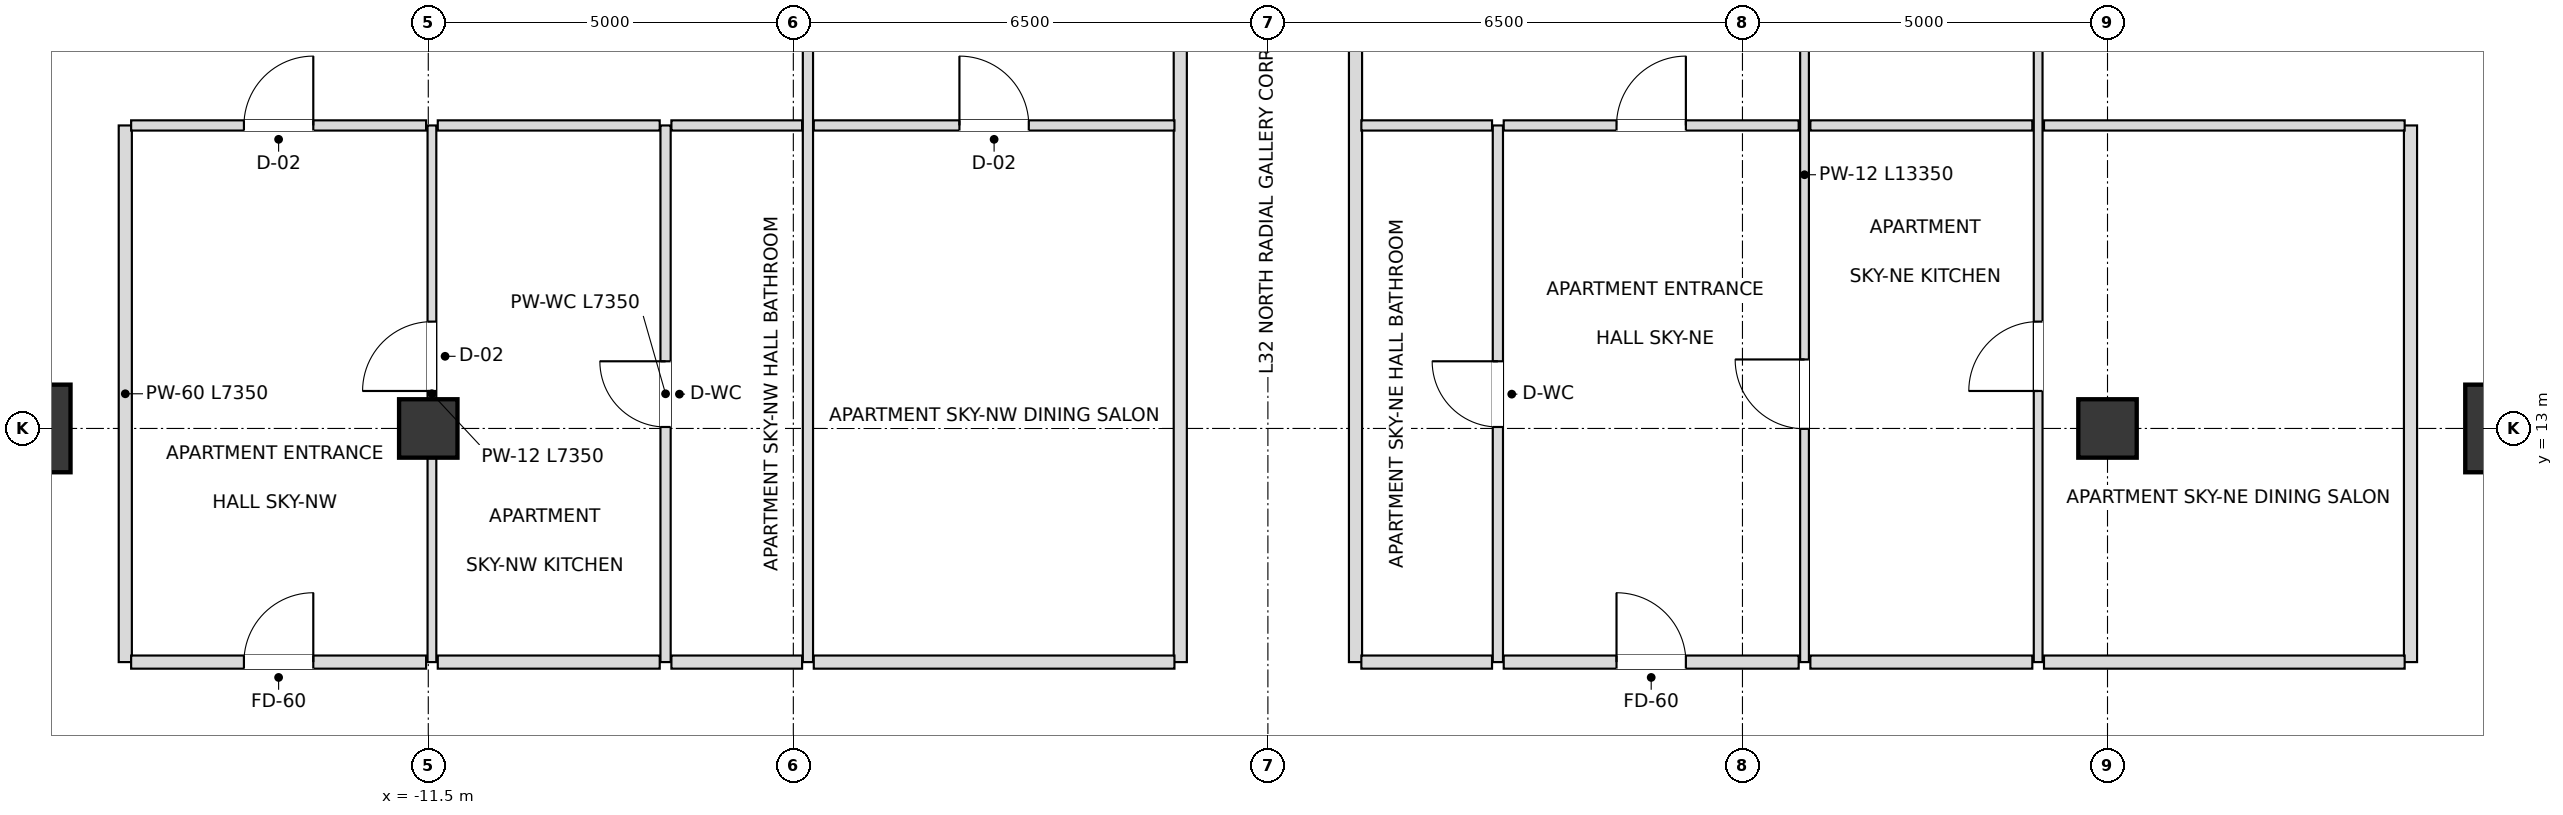
"""IFC4 building model, lengths in metres.
Left out: names, types, materials, properties, quantities, classifications, styles, units other than length and angle.
Written with IfcOpenShell. Run it as: python <this file> out.ifc"""

import sys

from ifc_helpers import new_model, si_unit, direction, frame, frame_2d, origin, origin_2d, place, context, subcontext, project, spatial, rectangle, extrude, element, fill, save


model = new_model("IFC4")
c1 = context("Model", 3, precision=1e-05, world=origin(), true_north=direction((0.0, 1.0)))
c2 = subcontext(c1, "Body", "Model", "MODEL_VIEW")
j1 = project(units=[si_unit("LENGTHUNIT", "METRE"), si_unit("PLANEANGLEUNIT", "RADIAN")], contexts=[c1])
p1 = place(None, origin())
s1 = spatial("IfcSite", under=j1, at=p1, CompositionType="ELEMENT")
p2 = place(p1, origin())
s2 = spatial("IfcBuilding", under=s1, at=p2, CompositionType="ELEMENT")
p3 = place(p2, frame((0.0, 0.0, 129.6)))
s3 = spatial("IfcBuildingStorey", under=s2, at=p3, CompositionType="ELEMENT", Elevation=129.6)
for number, where, z_axis, x_axis in (
    (1, (17.0, 13.0, 0.0), (0.0, 0.0, 1.0), (1.0, 0.0, 0.0)),
    (2, (-17.0, 13.0, 0.0), (0.0, 0.0, 1.0), (1.0, 0.0, 0.0)),
):
    element("IfcColumn", number, at=place(p3, frame(where, z_axis=z_axis, x_axis=x_axis)), inside=s3, PredefinedType="USERDEFINED", context=c2, shape_type="SweptSolid", body=[
        extrude(rectangle(XDim=1.2, YDim=1.2, at=origin_2d()), origin(), (0.0, 0.0, 1.0), 3.6),
    ])
for number, where, z_axis, x_axis in (
    (3, (-11.5, 13.0, 0.0), (0.0, 0.0, 1.0), (1.0, 0.0, 0.0)),
    (4, (11.5, 13.0, 0.0), (0.0, 0.0, 1.0), (1.0, 0.0, 0.0)),
):
    element("IfcColumn", number, at=place(p3, frame(where, z_axis=z_axis, x_axis=x_axis)), inside=s3, PredefinedType="COLUMN", context=c2, shape_type="SweptSolid", body=[
        extrude(rectangle(XDim=0.8, YDim=0.8, at=origin_2d()), origin(), (0.0, 0.0, 1.0), 3.6),
    ])
p4 = place(p3, frame((-15.65, 9.8, 0.0), z_axis=(0.0, 0.0, 1.0), x_axis=(0.0, 1.0, 0.0)))
e5 = element("IfcWall", 5, at=p4, inside=s3, PredefinedType="PARTITIONING", context=c2, shape_type="SweptSolid", body=[
    extrude(rectangle(XDim=7.35, YDim=0.18, at=frame_2d((3.675, 0.0))), origin(), (0.0, 0.0, 1.0), 2.736),
])
p5 = place(p3, frame((-11.45, 9.8, 0.0), z_axis=(0.0, 0.0, 1.0), x_axis=(0.0, 1.0, 0.0)))
e6 = element("IfcWall", 6, at=p5, inside=s3, PredefinedType="PARTITIONING", context=c2, shape_type="SweptSolid", body=[
    extrude(rectangle(XDim=7.35, YDim=0.12, at=frame_2d((3.675, 0.0))), origin(), (0.0, 0.0, 1.0), 2.736),
])
p6 = place(p5, frame((3.713, 0.0, 0.0)))
e7 = element("IfcOpeningElement", 7, at=p6, cuts=e6, PredefinedType="OPENING", context=c2, shape_type="SweptSolid", body=[
    extrude(rectangle(XDim=0.95, YDim=2.1, at=frame_2d((0.475, 1.05))), frame((0.0, 0.07, 0.0), z_axis=(0.0, -1.0, 0.0), x_axis=(1.0, 0.0, 0.0)), (0.0, 0.0, 1.0), 0.14),
])
p7 = place(p3, frame((-8.25, 9.8, 0.0), z_axis=(0.0, 0.0, 1.0), x_axis=(0.0, 1.0, 0.0)))
e8 = element("IfcWall", 8, at=p7, inside=s3, PredefinedType="PARTITIONING", context=c2, shape_type="SweptSolid", body=[
    extrude(rectangle(XDim=7.35, YDim=0.14, at=frame_2d((3.675, 0.0))), origin(), (0.0, 0.0, 1.0), 2.816),
])
p8 = place(p7, frame((3.22, 0.0, 0.0)))
e9 = element("IfcOpeningElement", 9, at=p8, cuts=e8, PredefinedType="OPENING", context=c2, shape_type="SweptSolid", body=[
    extrude(rectangle(XDim=0.9, YDim=2.1, at=frame_2d((0.45, 1.05))), frame((0.0, 0.08, 0.0), z_axis=(0.0, -1.0, 0.0), x_axis=(1.0, 0.0, 0.0)), (0.0, 0.0, 1.0), 0.16),
])
p9 = place(p3, frame((-6.3, 9.8, 0.0), z_axis=(0.0, 0.0, 1.0), x_axis=(0.0, 1.0, 0.0)))
e10 = element("IfcWall", 10, at=p9, inside=s3, PredefinedType="PARTITIONING", context=c2, shape_type="SweptSolid", body=[
    extrude(rectangle(XDim=13.35, YDim=0.14, at=frame_2d((6.675, 0.0))), origin(), (0.0, 0.0, 1.0), 2.816),
])
p10 = place(p9, frame((11.051, 0.0, 0.0)))
e11 = element("IfcOpeningElement", 11, at=p10, cuts=e10, PredefinedType="OPENING", context=c2, shape_type="SweptSolid", body=[
    extrude(rectangle(XDim=0.9, YDim=2.1, at=frame_2d((0.45, 1.05))), frame((0.0, 0.08, 0.0), z_axis=(0.0, -1.0, 0.0), x_axis=(1.0, 0.0, 0.0)), (0.0, 0.0, 1.0), 0.16),
])
for number, where, z_axis, x_axis in (
    (12, (-1.2, 9.8, 0.0), (0.0, 0.0, 1.0), (0.0, 1.0, 0.0)),
    (13, (1.2, 9.8, 0.0), (0.0, 0.0, 1.0), (0.0, 1.0, 0.0)),
):
    element("IfcWall", number, at=place(p3, frame(where, z_axis=z_axis, x_axis=x_axis)), inside=s3, PredefinedType="PARTITIONING", context=c2, shape_type="SweptSolid", body=[
        extrude(rectangle(XDim=13.35, YDim=0.18, at=frame_2d((6.675, 0.0))), origin(), (0.0, 0.0, 1.0), 2.816),
    ])
p11 = place(p3, frame((3.15, 9.8, 0.0), z_axis=(0.0, 0.0, 1.0), x_axis=(0.0, 1.0, 0.0)))
e14 = element("IfcWall", 14, at=p11, inside=s3, PredefinedType="PARTITIONING", context=c2, shape_type="SweptSolid", body=[
    extrude(rectangle(XDim=7.35, YDim=0.14, at=frame_2d((3.675, 0.0))), origin(), (0.0, 0.0, 1.0), 3.38),
])
p12 = place(p11, frame((3.22, 0.0, 0.0)))
e15 = element("IfcOpeningElement", 15, at=p12, cuts=e14, PredefinedType="OPENING", context=c2, shape_type="SweptSolid", body=[
    extrude(rectangle(XDim=0.9, YDim=2.1, at=frame_2d((0.45, 1.05))), frame((0.0, 0.08, 0.0), z_axis=(0.0, -1.0, 0.0), x_axis=(1.0, 0.0, 0.0)), (0.0, 0.0, 1.0), 0.16),
])
p13 = place(p3, frame((7.35, 9.8, 0.0), z_axis=(0.0, 0.0, 1.0), x_axis=(0.0, 1.0, 0.0)))
e16 = element("IfcWall", 16, at=p13, inside=s3, PredefinedType="PARTITIONING", context=c2, shape_type="SweptSolid", body=[
    extrude(rectangle(XDim=13.35, YDim=0.12, at=frame_2d((6.675, 0.0))), origin(), (0.0, 0.0, 1.0), 2.816),
])
p14 = place(p13, frame((3.195, 0.0, 0.0)))
e17 = element("IfcOpeningElement", 17, at=p14, cuts=e16, PredefinedType="OPENING", context=c2, shape_type="SweptSolid", body=[
    extrude(rectangle(XDim=0.95, YDim=2.1, at=frame_2d((0.475, 1.05))), frame((0.0, 0.07, 0.0), z_axis=(0.0, -1.0, 0.0), x_axis=(1.0, 0.0, 0.0)), (0.0, 0.0, 1.0), 0.14),
])
p15 = place(p13, frame((11.051, 0.0, 0.0)))
e18 = element("IfcOpeningElement", 18, at=p15, cuts=e16, PredefinedType="OPENING", context=c2, shape_type="SweptSolid", body=[
    extrude(rectangle(XDim=0.9, YDim=2.1, at=frame_2d((0.45, 1.05))), frame((0.0, 0.07, 0.0), z_axis=(0.0, -1.0, 0.0), x_axis=(1.0, 0.0, 0.0)), (0.0, 0.0, 1.0), 0.14),
])
p16 = place(p3, frame((10.55, 9.8, 0.0), z_axis=(0.0, 0.0, 1.0), x_axis=(0.0, 1.0, 0.0)))
e19 = element("IfcWall", 19, at=p16, inside=s3, PredefinedType="PARTITIONING", context=c2, shape_type="SweptSolid", body=[
    extrude(rectangle(XDim=13.35, YDim=0.12, at=frame_2d((6.675, 0.0))), origin(), (0.0, 0.0, 1.0), 2.816),
])
p17 = place(p16, frame((3.713, 0.0, 0.0)))
e20 = element("IfcOpeningElement", 20, at=p17, cuts=e19, PredefinedType="OPENING", context=c2, shape_type="SweptSolid", body=[
    extrude(rectangle(XDim=0.95, YDim=2.1, at=frame_2d((0.475, 1.05))), frame((0.0, 0.07, 0.0), z_axis=(0.0, -1.0, 0.0), x_axis=(1.0, 0.0, 0.0)), (0.0, 0.0, 1.0), 0.14),
])
p18 = place(p16, frame((11.051, 0.0, 0.0)))
e21 = element("IfcOpeningElement", 21, at=p18, cuts=e19, PredefinedType="OPENING", context=c2, shape_type="SweptSolid", body=[
    extrude(rectangle(XDim=0.9, YDim=2.1, at=frame_2d((0.45, 1.05))), frame((0.0, 0.07, 0.0), z_axis=(0.0, -1.0, 0.0), x_axis=(1.0, 0.0, 0.0)), (0.0, 0.0, 1.0), 0.14),
])
p19 = place(p3, frame((15.65, 9.8, 0.0), z_axis=(0.0, 0.0, 1.0), x_axis=(0.0, 1.0, 0.0)))
e22 = element("IfcWall", 22, at=p19, inside=s3, PredefinedType="PARTITIONING", context=c2, shape_type="SweptSolid", body=[
    extrude(rectangle(XDim=7.35, YDim=0.18, at=frame_2d((3.675, 0.0))), origin(), (0.0, 0.0, 1.0), 2.736),
])
p20 = place(p3, frame((-15.57, 9.8, 0.0), z_axis=(0.0, 0.0, 1.0), x_axis=(1.0, 0.0, 0.0)))
e23 = element("IfcWall", 23, at=p20, inside=s3, PredefinedType="PARTITIONING", context=c2, shape_type="SweptSolid", body=[
    extrude(rectangle(XDim=4.04, YDim=0.18, at=frame_2d((2.02, 0.0))), origin(), (0.0, 0.0, 1.0), 3.38),
])
p21 = place(p20, frame((1.545, 0.0, 0.0)))
e24 = element("IfcOpeningElement", 24, at=p21, cuts=e23, PredefinedType="OPENING", context=c2, shape_type="SweptSolid", body=[
    extrude(rectangle(XDim=0.95, YDim=2.15, at=frame_2d((0.475, 1.075))), frame((0.0, 0.1, 0.0), z_axis=(0.0, -1.0, 0.0), x_axis=(1.0, 0.0, 0.0)), (0.0, 0.0, 1.0), 0.2),
])
p22 = place(p3, frame((-11.37, 9.8, 0.0), z_axis=(0.0, 0.0, 1.0), x_axis=(1.0, 0.0, 0.0)))
e25 = element("IfcWall", 25, at=p22, inside=s3, PredefinedType="PARTITIONING", context=c2, shape_type="SweptSolid", body=[
    extrude(rectangle(XDim=3.04, YDim=0.18, at=frame_2d((1.52, 0.0))), origin(), (0.0, 0.0, 1.0), 3.38),
])
p23 = place(p3, frame((-8.17, 9.8, 0.0), z_axis=(0.0, 0.0, 1.0), x_axis=(1.0, 0.0, 0.0)))
e26 = element("IfcWall", 26, at=p23, inside=s3, PredefinedType="PARTITIONING", context=c2, shape_type="SweptSolid", body=[
    extrude(rectangle(XDim=1.79, YDim=0.18, at=frame_2d((0.895, 0.0))), origin(), (0.0, 0.0, 1.0), 2.816),
])
p24 = place(p3, frame((-6.22, 9.8, 0.0), z_axis=(0.0, 0.0, 1.0), x_axis=(1.0, 0.0, 0.0)))
e27 = element("IfcWall", 27, at=p24, inside=s3, PredefinedType="PARTITIONING", context=c2, shape_type="SweptSolid", body=[
    extrude(rectangle(XDim=4.94, YDim=0.18, at=frame_2d((2.47, 0.0))), origin(), (0.0, 0.0, 1.0), 3.38),
])
p25 = place(p3, frame((1.28, 9.8, 0.0), z_axis=(0.0, 0.0, 1.0), x_axis=(1.0, 0.0, 0.0)))
e28 = element("IfcWall", 28, at=p25, inside=s3, PredefinedType="PARTITIONING", context=c2, shape_type="SweptSolid", body=[
    extrude(rectangle(XDim=1.79, YDim=0.18, at=frame_2d((0.895, 0.0))), origin(), (0.0, 0.0, 1.0), 3.38),
])
p26 = place(p3, frame((3.23, 9.8, 0.0), z_axis=(0.0, 0.0, 1.0), x_axis=(1.0, 0.0, 0.0)))
e29 = element("IfcWall", 29, at=p26, inside=s3, PredefinedType="PARTITIONING", context=c2, shape_type="SweptSolid", body=[
    extrude(rectangle(XDim=4.04, YDim=0.18, at=frame_2d((2.02, 0.0))), origin(), (0.0, 0.0, 1.0), 2.816),
])
p27 = place(p26, frame((1.545, 0.0, 0.0)))
e30 = element("IfcOpeningElement", 30, at=p27, cuts=e29, PredefinedType="OPENING", context=c2, shape_type="SweptSolid", body=[
    extrude(rectangle(XDim=0.95, YDim=2.15, at=frame_2d((0.475, 1.075))), frame((0.0, 0.1, 0.0), z_axis=(0.0, -1.0, 0.0), x_axis=(1.0, 0.0, 0.0)), (0.0, 0.0, 1.0), 0.2),
])
p28 = place(p3, frame((7.43, 9.8, 0.0), z_axis=(0.0, 0.0, 1.0), x_axis=(1.0, 0.0, 0.0)))
e31 = element("IfcWall", 31, at=p28, inside=s3, PredefinedType="PARTITIONING", context=c2, shape_type="SweptSolid", body=[
    extrude(rectangle(XDim=3.04, YDim=0.18, at=frame_2d((1.52, 0.0))), origin(), (0.0, 0.0, 1.0), 3.38),
])
p29 = place(p3, frame((10.63, 9.8, 0.0), z_axis=(0.0, 0.0, 1.0), x_axis=(1.0, 0.0, 0.0)))
e32 = element("IfcWall", 32, at=p29, inside=s3, PredefinedType="PARTITIONING", context=c2, shape_type="SweptSolid", body=[
    extrude(rectangle(XDim=4.94, YDim=0.18, at=frame_2d((2.47, 0.0))), origin(), (0.0, 0.0, 1.0), 3.38),
])
p30 = place(p3, frame((-15.57, 17.15, 0.0), z_axis=(0.0, 0.0, 1.0), x_axis=(1.0, 0.0, 0.0)))
e33 = element("IfcWall", 33, at=p30, inside=s3, PredefinedType="PARTITIONING", context=c2, shape_type="SweptSolid", body=[
    extrude(rectangle(XDim=4.04, YDim=0.14, at=frame_2d((2.02, 0.0))), origin(), (0.0, 0.0, 1.0), 2.736),
])
p31 = place(p30, frame((1.545, 0.0, 0.0)))
e34 = element("IfcOpeningElement", 34, at=p31, cuts=e33, PredefinedType="OPENING", context=c2, shape_type="SweptSolid", body=[
    extrude(rectangle(XDim=0.95, YDim=2.1, at=frame_2d((0.475, 1.05))), frame((0.0, 0.08, 0.0), z_axis=(0.0, -1.0, 0.0), x_axis=(1.0, 0.0, 0.0)), (0.0, 0.0, 1.0), 0.16),
])
p32 = place(p3, frame((-11.37, 17.15, 0.0), z_axis=(0.0, 0.0, 1.0), x_axis=(1.0, 0.0, 0.0)))
e35 = element("IfcWall", 35, at=p32, inside=s3, PredefinedType="PARTITIONING", context=c2, shape_type="SweptSolid", body=[
    extrude(rectangle(XDim=3.04, YDim=0.14, at=frame_2d((1.52, 0.0))), origin(), (0.0, 0.0, 1.0), 3.38),
])
p33 = place(p3, frame((-8.17, 17.15, 0.0), z_axis=(0.0, 0.0, 1.0), x_axis=(1.0, 0.0, 0.0)))
e36 = element("IfcWall", 36, at=p33, inside=s3, PredefinedType="PARTITIONING", context=c2, shape_type="SweptSolid", body=[
    extrude(rectangle(XDim=1.79, YDim=0.14, at=frame_2d((0.895, 0.0))), origin(), (0.0, 0.0, 1.0), 2.816),
])
p34 = place(p3, frame((-6.22, 17.15, 0.0), z_axis=(0.0, 0.0, 1.0), x_axis=(1.0, 0.0, 0.0)))
e37 = element("IfcWall", 37, at=p34, inside=s3, PredefinedType="PARTITIONING", context=c2, shape_type="SweptSolid", body=[
    extrude(rectangle(XDim=4.94, YDim=0.14, at=frame_2d((2.47, 0.0))), origin(), (0.0, 0.0, 1.0), 3.38),
])
p35 = place(p34, frame((1.995, 0.0, 0.0)))
e38 = element("IfcOpeningElement", 38, at=p35, cuts=e37, PredefinedType="OPENING", context=c2, shape_type="SweptSolid", body=[
    extrude(rectangle(XDim=0.95, YDim=2.1, at=frame_2d((0.475, 1.05))), frame((0.0, 0.08, 0.0), z_axis=(0.0, -1.0, 0.0), x_axis=(1.0, 0.0, 0.0)), (0.0, 0.0, 1.0), 0.16),
])
p36 = place(p3, frame((1.28, 17.15, 0.0), z_axis=(0.0, 0.0, 1.0), x_axis=(1.0, 0.0, 0.0)))
e39 = element("IfcWall", 39, at=p36, inside=s3, PredefinedType="PARTITIONING", context=c2, shape_type="SweptSolid", body=[
    extrude(rectangle(XDim=1.79, YDim=0.14, at=frame_2d((0.895, 0.0))), origin(), (0.0, 0.0, 1.0), 3.38),
])
p37 = place(p3, frame((3.23, 17.15, 0.0), z_axis=(0.0, 0.0, 1.0), x_axis=(1.0, 0.0, 0.0)))
e40 = element("IfcWall", 40, at=p37, inside=s3, PredefinedType="PARTITIONING", context=c2, shape_type="SweptSolid", body=[
    extrude(rectangle(XDim=4.04, YDim=0.14, at=frame_2d((2.02, 0.0))), origin(), (0.0, 0.0, 1.0), 2.816),
])
p38 = place(p37, frame((1.545, 0.0, 0.0)))
e41 = element("IfcOpeningElement", 41, at=p38, cuts=e40, PredefinedType="OPENING", context=c2, shape_type="SweptSolid", body=[
    extrude(rectangle(XDim=0.95, YDim=2.1, at=frame_2d((0.475, 1.05))), frame((0.0, 0.08, 0.0), z_axis=(0.0, -1.0, 0.0), x_axis=(1.0, 0.0, 0.0)), (0.0, 0.0, 1.0), 0.16),
])
p39 = place(p3, frame((7.43, 17.15, 0.0), z_axis=(0.0, 0.0, 1.0), x_axis=(1.0, 0.0, 0.0)))
e42 = element("IfcWall", 42, at=p39, inside=s3, PredefinedType="PARTITIONING", context=c2, shape_type="SweptSolid", body=[
    extrude(rectangle(XDim=3.04, YDim=0.14, at=frame_2d((1.52, 0.0))), origin(), (0.0, 0.0, 1.0), 3.38),
])
p40 = place(p3, frame((10.63, 17.15, 0.0), z_axis=(0.0, 0.0, 1.0), x_axis=(1.0, 0.0, 0.0)))
e43 = element("IfcWall", 43, at=p40, inside=s3, PredefinedType="PARTITIONING", context=c2, shape_type="SweptSolid", body=[
    extrude(rectangle(XDim=4.94, YDim=0.14, at=frame_2d((2.47, 0.0))), origin(), (0.0, 0.0, 1.0), 2.736),
])
p41 = place(p21, origin())
e44 = element("IfcDoor", 44, at=p41, inside=s3, OperationType="SINGLE_SWING_RIGHT", PredefinedType="DOOR", context=c2, shape_type="SweptSolid", body=[
    extrude(rectangle(XDim=0.95, YDim=2.15, at=frame_2d((0.475, 1.075))), frame((0.0, 0.025, 0.0), z_axis=(0.0, -1.0, 0.0), x_axis=(1.0, 0.0, 0.0)), (0.0, 0.0, 1.0), 0.05),
])
fill(e24, e44)
p42 = place(p6, origin())
e45 = element("IfcDoor", 45, at=p42, inside=s3, OperationType="SINGLE_SWING_LEFT", PredefinedType="DOOR", context=c2, shape_type="SweptSolid", body=[
    extrude(rectangle(XDim=0.95, YDim=2.1, at=frame_2d((0.475, 1.05))), frame((0.0, 0.025, 0.0), z_axis=(0.0, -1.0, 0.0), x_axis=(1.0, 0.0, 0.0)), (0.0, 0.0, 1.0), 0.05),
])
fill(e7, e45)
p43 = place(p8, origin())
e46 = element("IfcDoor", 46, at=p43, inside=s3, OperationType="SINGLE_SWING_RIGHT", PredefinedType="DOOR", context=c2, shape_type="SweptSolid", body=[
    extrude(rectangle(XDim=0.9, YDim=2.1, at=frame_2d((0.45, 1.05))), frame((0.0, 0.025, 0.0), z_axis=(0.0, -1.0, 0.0), x_axis=(1.0, 0.0, 0.0)), (0.0, 0.0, 1.0), 0.05),
])
fill(e9, e46)
p44 = place(p35, origin())
e47 = element("IfcDoor", 47, at=p44, inside=s3, OperationType="SINGLE_SWING_LEFT", PredefinedType="DOOR", context=c2, shape_type="SweptSolid", body=[
    extrude(rectangle(XDim=0.95, YDim=2.1, at=frame_2d((0.475, 1.05))), frame((0.0, 0.025, 0.0), z_axis=(0.0, -1.0, 0.0), x_axis=(1.0, 0.0, 0.0)), (0.0, 0.0, 1.0), 0.05),
])
fill(e38, e47)
p45 = place(p31, origin())
e48 = element("IfcDoor", 48, at=p45, inside=s3, OperationType="SINGLE_SWING_RIGHT", PredefinedType="DOOR", context=c2, shape_type="SweptSolid", body=[
    extrude(rectangle(XDim=0.95, YDim=2.1, at=frame_2d((0.475, 1.05))), frame((0.0, 0.025, 0.0), z_axis=(0.0, -1.0, 0.0), x_axis=(1.0, 0.0, 0.0)), (0.0, 0.0, 1.0), 0.05),
])
fill(e34, e48)
p46 = place(p12, origin())
e49 = element("IfcDoor", 49, at=p46, inside=s3, OperationType="SINGLE_SWING_RIGHT", PredefinedType="DOOR", context=c2, shape_type="SweptSolid", body=[
    extrude(rectangle(XDim=0.9, YDim=2.1, at=frame_2d((0.45, 1.05))), frame((0.0, 0.025, 0.0), z_axis=(0.0, -1.0, 0.0), x_axis=(1.0, 0.0, 0.0)), (0.0, 0.0, 1.0), 0.05),
])
fill(e15, e49)
p47 = place(p27, origin())
e50 = element("IfcDoor", 50, at=p47, inside=s3, OperationType="SINGLE_SWING_LEFT", PredefinedType="DOOR", context=c2, shape_type="SweptSolid", body=[
    extrude(rectangle(XDim=0.95, YDim=2.15, at=frame_2d((0.475, 1.075))), frame((0.0, 0.025, 0.0), z_axis=(0.0, -1.0, 0.0), x_axis=(1.0, 0.0, 0.0)), (0.0, 0.0, 1.0), 0.05),
])
fill(e30, e50)
p48 = place(p14, origin())
e51 = element("IfcDoor", 51, at=p48, inside=s3, OperationType="SINGLE_SWING_RIGHT", PredefinedType="DOOR", context=c2, shape_type="SweptSolid", body=[
    extrude(rectangle(XDim=0.95, YDim=2.1, at=frame_2d((0.475, 1.05))), frame((0.0, 0.025, 0.0), z_axis=(0.0, -1.0, 0.0), x_axis=(1.0, 0.0, 0.0)), (0.0, 0.0, 1.0), 0.05),
])
fill(e17, e51)
p49 = place(p17, origin())
e52 = element("IfcDoor", 52, at=p49, inside=s3, OperationType="SINGLE_SWING_LEFT", PredefinedType="DOOR", context=c2, shape_type="SweptSolid", body=[
    extrude(rectangle(XDim=0.95, YDim=2.1, at=frame_2d((0.475, 1.05))), frame((0.0, 0.025, 0.0), z_axis=(0.0, -1.0, 0.0), x_axis=(1.0, 0.0, 0.0)), (0.0, 0.0, 1.0), 0.05),
])
fill(e20, e52)
p50 = place(p38, origin())
e53 = element("IfcDoor", 53, at=p50, inside=s3, OperationType="SINGLE_SWING_RIGHT", PredefinedType="DOOR", context=c2, shape_type="SweptSolid", body=[
    extrude(rectangle(XDim=0.95, YDim=2.1, at=frame_2d((0.475, 1.05))), frame((0.0, 0.025, 0.0), z_axis=(0.0, -1.0, 0.0), x_axis=(1.0, 0.0, 0.0)), (0.0, 0.0, 1.0), 0.05),
])
fill(e41, e53)
save(model, sys.argv[1])
